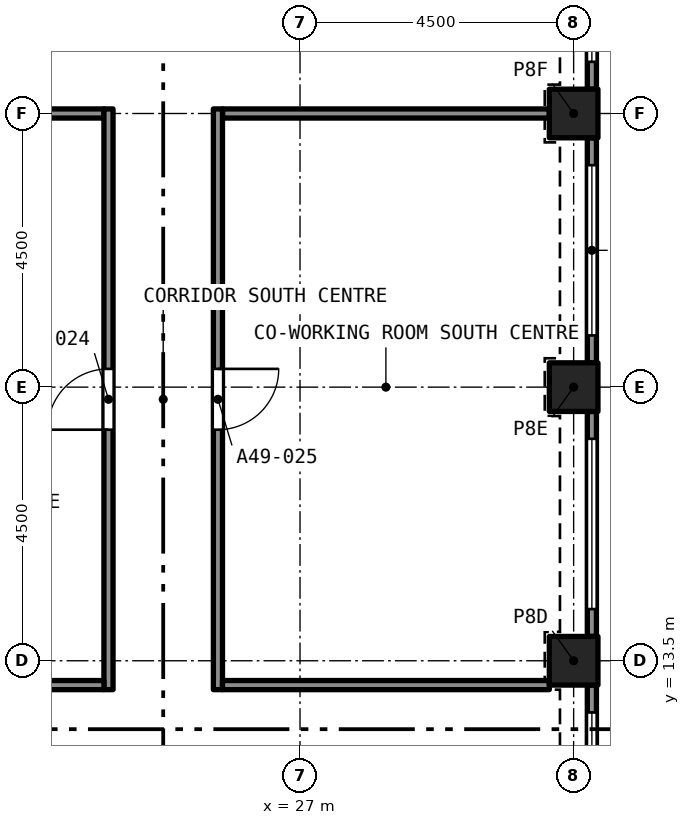
"""IFC4 building model, lengths in metres.
Left out: names, types, materials, properties, quantities, classifications, styles, units other than length and angle.
Written with IfcOpenShell. Run it as: python <this file> out.ifc"""

import sys

from ifc_helpers import new_model, si_unit, direction, frame, frame_2d, origin, origin_2d, place, context, subcontext, project, spatial, rectangle, extrude, element, fill, save


model = new_model("IFC4")
c1 = context("Model", 3, precision=1e-05, world=origin(), true_north=direction((0.0, 1.0)))
c2 = subcontext(c1, "Body", "Model", "MODEL_VIEW")
j1 = project(units=[si_unit("LENGTHUNIT", "METRE"), si_unit("PLANEANGLEUNIT", "RADIAN")], contexts=[c1])
p1 = place(None, origin())
s1 = spatial("IfcSite", under=j1, at=p1, CompositionType="ELEMENT")
p2 = place(p1, origin())
s2 = spatial("IfcBuilding", under=s1, at=p2, CompositionType="ELEMENT")
p3 = place(p2, frame((0.0, 0.0, 179.5)))
s3 = spatial("IfcBuildingStorey", under=s2, at=p3, CompositionType="ELEMENT", Elevation=179.5)
for number, where, z_axis, x_axis in (
    (1, (31.5, 13.5, 0.0), (0.0, 0.0, 1.0), (1.0, 0.0, 0.0)),
    (2, (31.5, 18.0, 0.0), (0.0, 0.0, 1.0), (1.0, 0.0, 0.0)),
    (3, (31.5, 22.5, 0.0), (0.0, 0.0, 1.0), (1.0, 0.0, 0.0)),
):
    element("IfcColumn", number, at=place(p3, frame(where, z_axis=z_axis, x_axis=x_axis)), inside=s3, PredefinedType="COLUMN", context=c2, shape_type="SweptSolid", body=[
        extrude(rectangle(XDim=0.8, YDim=0.8, at=origin_2d()), origin(), (0.0, 0.0, 1.0), 3.2),
    ])
p4 = place(p3, frame((31.8, 13.1, 0.0), z_axis=(0.0, 0.0, 1.0), x_axis=(0.0, -1.0, 0.0)))
e4 = element("IfcWall", 4, at=p4, inside=s3, PredefinedType="SOLIDWALL", context=c2, shape_type="SweptSolid", body=[
    extrude(rectangle(XDim=3.7, YDim=0.15, at=frame_2d((1.85, 0.0))), origin(), (0.0, 0.0, 1.0), 3.2),
])
p5 = place(p4, frame((0.45, 0.0, 0.45)))
e5 = element("IfcOpeningElement", 5, at=p5, cuts=e4, PredefinedType="OPENING", context=c2, shape_type="SweptSolid", body=[
    extrude(rectangle(XDim=2.8, YDim=1.95, at=frame_2d((1.4, 0.975))), frame((0.0, 0.085, 0.0), z_axis=(0.0, -1.0, 0.0), x_axis=(1.0, 0.0, 0.0)), (0.0, 0.0, 1.0), 0.17),
])
p6 = place(p3, frame((31.8, 17.6, 0.0), z_axis=(0.0, 0.0, 1.0), x_axis=(0.0, -1.0, 0.0)))
e6 = element("IfcWall", 6, at=p6, inside=s3, PredefinedType="SOLIDWALL", context=c2, shape_type="SweptSolid", body=[
    extrude(rectangle(XDim=3.7, YDim=0.15, at=frame_2d((1.85, 0.0))), origin(), (0.0, 0.0, 1.0), 3.2),
])
p7 = place(p6, frame((0.45, 0.0, 0.45)))
e7 = element("IfcOpeningElement", 7, at=p7, cuts=e6, PredefinedType="OPENING", context=c2, shape_type="SweptSolid", body=[
    extrude(rectangle(XDim=2.8, YDim=1.95, at=frame_2d((1.4, 0.975))), frame((0.0, 0.085, 0.0), z_axis=(0.0, -1.0, 0.0), x_axis=(1.0, 0.0, 0.0)), (0.0, 0.0, 1.0), 0.17),
])
p8 = place(p3, frame((31.8, 22.1, 0.0), z_axis=(0.0, 0.0, 1.0), x_axis=(0.0, -1.0, 0.0)))
e8 = element("IfcWall", 8, at=p8, inside=s3, PredefinedType="SOLIDWALL", context=c2, shape_type="SweptSolid", body=[
    extrude(rectangle(XDim=3.7, YDim=0.15, at=frame_2d((1.85, 0.0))), origin(), (0.0, 0.0, 1.0), 3.2),
])
p9 = place(p8, frame((0.45, 0.0, 0.45)))
e9 = element("IfcOpeningElement", 9, at=p9, cuts=e8, PredefinedType="OPENING", context=c2, shape_type="SweptSolid", body=[
    extrude(rectangle(XDim=2.8, YDim=1.95, at=frame_2d((1.4, 0.975))), frame((0.0, 0.085, 0.0), z_axis=(0.0, -1.0, 0.0), x_axis=(1.0, 0.0, 0.0)), (0.0, 0.0, 1.0), 0.17),
])
p10 = place(p3, frame((31.8, 26.6, 0.0), z_axis=(0.0, 0.0, 1.0), x_axis=(0.0, -1.0, 0.0)))
e10 = element("IfcWall", 10, at=p10, inside=s3, PredefinedType="SOLIDWALL", context=c2, shape_type="SweptSolid", body=[
    extrude(rectangle(XDim=3.7, YDim=0.15, at=frame_2d((1.85, 0.0))), origin(), (0.0, 0.0, 1.0), 3.2),
])
p11 = place(p10, frame((0.45, 0.0, 0.45)))
e11 = element("IfcOpeningElement", 11, at=p11, cuts=e10, PredefinedType="OPENING", context=c2, shape_type="SweptSolid", body=[
    extrude(rectangle(XDim=2.8, YDim=1.95, at=frame_2d((1.4, 0.975))), frame((0.0, 0.085, 0.0), z_axis=(0.0, -1.0, 0.0), x_axis=(1.0, 0.0, 0.0)), (0.0, 0.0, 1.0), 0.17),
])
for number, where, z_axis, x_axis in (
    (12, (18.4, 22.5, 0.0), (0.0, 0.0, 1.0), (1.0, 0.0, 0.0)),
    (13, (25.725, 22.5, 0.0), (0.0, 0.0, 1.0), (1.0, 0.0, 0.0)),
):
    element("IfcWall", number, at=place(p3, frame(where, z_axis=z_axis, x_axis=x_axis)), inside=s3, PredefinedType="PARTITIONING", context=c2, shape_type="SweptSolid", body=[
        extrude(rectangle(XDim=5.375, YDim=0.15, at=frame_2d((2.688, 0.0))), origin(), (0.0, 0.0, 1.0), 2.75),
    ])
p12 = place(p3, frame((23.85, 13.025, 0.0), z_axis=(0.0, 0.0, 1.0), x_axis=(0.0, 1.0, 0.0)))
e14 = element("IfcWall", 14, at=p12, inside=s3, PredefinedType="PARTITIONING", context=c2, shape_type="SweptSolid", body=[
    extrude(rectangle(XDim=9.55, YDim=0.15, at=frame_2d((4.775, 0.0))), origin(), (0.0, 0.0, 1.0), 2.75),
])
p13 = place(p12, frame((4.275, 0.0, 0.0)))
e15 = element("IfcOpeningElement", 15, at=p13, cuts=e14, PredefinedType="OPENING", context=c2, shape_type="SweptSolid", body=[
    extrude(rectangle(XDim=1.0, YDim=2.1, at=frame_2d((0.5, 1.05))), frame((0.0, 0.085, 0.0), z_axis=(0.0, -1.0, 0.0), x_axis=(1.0, 0.0, 0.0)), (0.0, 0.0, 1.0), 0.17),
])
p14 = place(p3, frame((25.65, 22.575, 0.0), z_axis=(0.0, 0.0, 1.0), x_axis=(0.0, -1.0, 0.0)))
e16 = element("IfcWall", 16, at=p14, inside=s3, PredefinedType="PARTITIONING", context=c2, shape_type="SweptSolid", body=[
    extrude(rectangle(XDim=9.55, YDim=0.15, at=frame_2d((4.775, 0.0))), origin(), (0.0, 0.0, 1.0), 2.75),
])
p15 = place(p14, frame((4.275, 0.0, 0.0)))
e17 = element("IfcOpeningElement", 17, at=p15, cuts=e16, PredefinedType="OPENING", context=c2, shape_type="SweptSolid", body=[
    extrude(rectangle(XDim=1.0, YDim=2.1, at=frame_2d((0.5, 1.05))), frame((0.0, 0.085, 0.0), z_axis=(0.0, -1.0, 0.0), x_axis=(1.0, 0.0, 0.0)), (0.0, 0.0, 1.0), 0.17),
])
for number, where, z_axis, x_axis in (
    (18, (18.4, 13.1, 0.0), (0.0, 0.0, 1.0), (1.0, 0.0, 0.0)),
    (19, (25.725, 13.1, 0.0), (0.0, 0.0, 1.0), (1.0, 0.0, 0.0)),
):
    element("IfcWall", number, at=place(p3, frame(where, z_axis=z_axis, x_axis=x_axis)), inside=s3, PredefinedType="PARTITIONING", context=c2, shape_type="SweptSolid", body=[
        extrude(rectangle(XDim=5.375, YDim=0.15, at=frame_2d((2.688, 0.0))), origin(), (0.0, 0.0, 1.0), 2.75),
    ])
p16 = place(p5, origin())
e20 = element("IfcWindow", 20, at=p16, inside=s3, PartitioningType="SINGLE_PANEL", PredefinedType="WINDOW", context=c2, shape_type="SweptSolid", body=[
    extrude(rectangle(XDim=2.8, YDim=1.95, at=frame_2d((1.4, 0.975))), frame((0.0, 0.03, 0.0), z_axis=(0.0, -1.0, 0.0), x_axis=(1.0, 0.0, 0.0)), (0.0, 0.0, 1.0), 0.06),
])
fill(e5, e20)
p17 = place(p7, origin())
e21 = element("IfcWindow", 21, at=p17, inside=s3, PartitioningType="SINGLE_PANEL", PredefinedType="WINDOW", context=c2, shape_type="SweptSolid", body=[
    extrude(rectangle(XDim=2.8, YDim=1.95, at=frame_2d((1.4, 0.975))), frame((0.0, 0.03, 0.0), z_axis=(0.0, -1.0, 0.0), x_axis=(1.0, 0.0, 0.0)), (0.0, 0.0, 1.0), 0.06),
])
fill(e7, e21)
p18 = place(p9, origin())
e22 = element("IfcWindow", 22, at=p18, inside=s3, PartitioningType="SINGLE_PANEL", PredefinedType="WINDOW", context=c2, shape_type="SweptSolid", body=[
    extrude(rectangle(XDim=2.8, YDim=1.95, at=frame_2d((1.4, 0.975))), frame((0.0, 0.03, 0.0), z_axis=(0.0, -1.0, 0.0), x_axis=(1.0, 0.0, 0.0)), (0.0, 0.0, 1.0), 0.06),
])
fill(e9, e22)
p19 = place(p11, origin())
e23 = element("IfcWindow", 23, at=p19, inside=s3, PartitioningType="SINGLE_PANEL", PredefinedType="WINDOW", context=c2, shape_type="SweptSolid", body=[
    extrude(rectangle(XDim=2.8, YDim=1.95, at=frame_2d((1.4, 0.975))), frame((0.0, 0.03, 0.0), z_axis=(0.0, -1.0, 0.0), x_axis=(1.0, 0.0, 0.0)), (0.0, 0.0, 1.0), 0.06),
])
fill(e11, e23)
p20 = place(p13, origin())
e24 = element("IfcDoor", 24, at=p20, inside=s3, OperationType="SINGLE_SWING_RIGHT", PredefinedType="DOOR", context=c2, shape_type="SweptSolid", body=[
    extrude(rectangle(XDim=1.0, YDim=2.1, at=frame_2d((0.5, 1.05))), frame((0.0, 0.025, 0.0), z_axis=(0.0, -1.0, 0.0), x_axis=(1.0, 0.0, 0.0)), (0.0, 0.0, 1.0), 0.05),
])
fill(e15, e24)
p21 = place(p15, origin())
e25 = element("IfcDoor", 25, at=p21, inside=s3, OperationType="SINGLE_SWING_LEFT", PredefinedType="DOOR", context=c2, shape_type="SweptSolid", body=[
    extrude(rectangle(XDim=1.0, YDim=2.1, at=frame_2d((0.5, 1.05))), frame((0.0, 0.025, 0.0), z_axis=(0.0, -1.0, 0.0), x_axis=(1.0, 0.0, 0.0)), (0.0, 0.0, 1.0), 0.05),
])
fill(e17, e25)
save(model, sys.argv[1])
